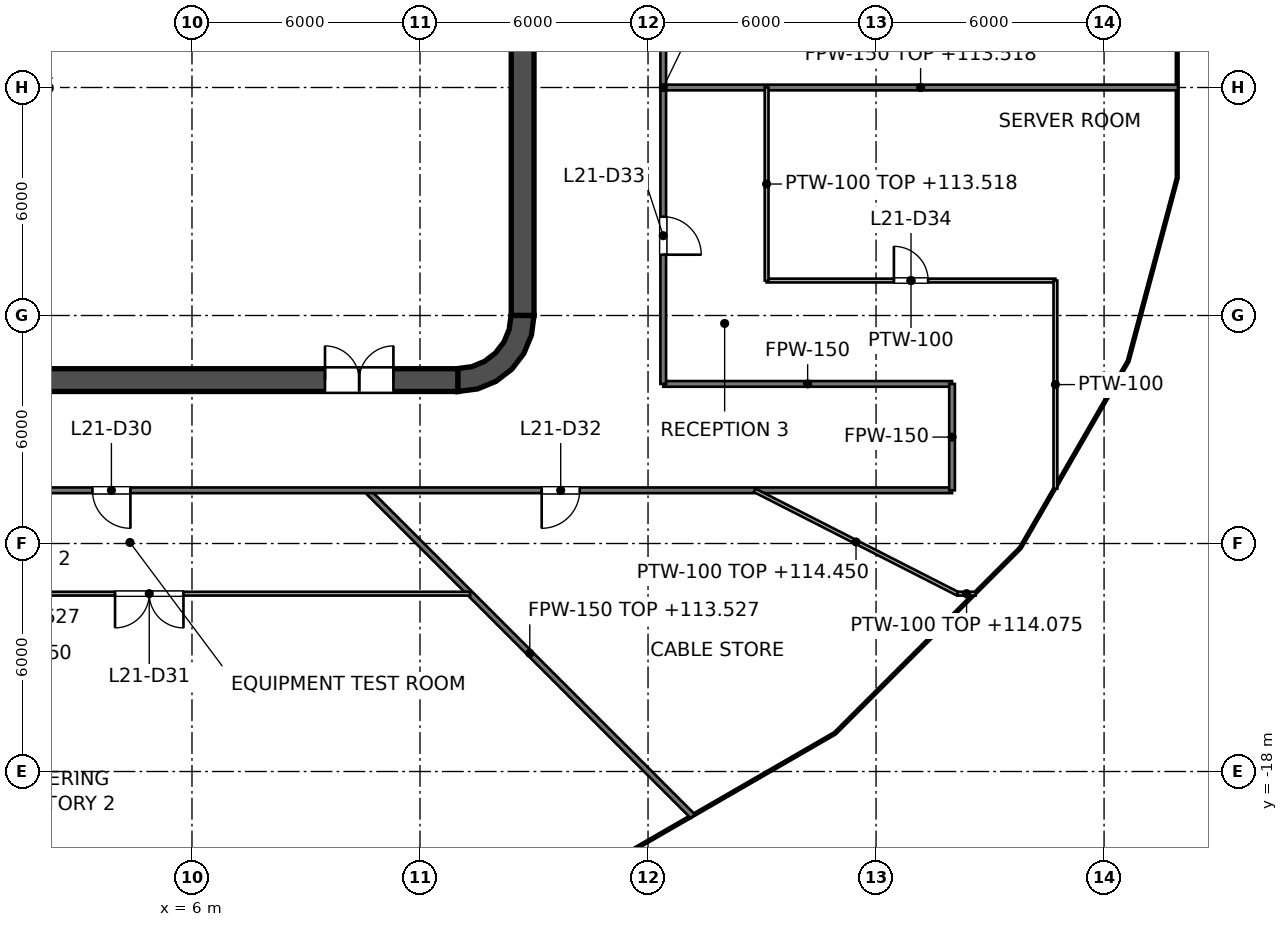
"""IFC4 building model, lengths in metres.
Left out: names, types, materials, properties, quantities, classifications, styles, units other than length and angle.
Written with IfcOpenShell. Run it as: python <this file> out.ifc"""

import sys

from ifc_helpers import new_model, si_unit, direction, frame, frame_2d, origin, place, context, subcontext, project, spatial, polyline, rectangle, outline, extrude, element, fill, save


model = new_model("IFC4")
c1 = context("Model", 3, precision=1e-05, world=origin(), true_north=direction((0.0, 1.0)))
c2 = subcontext(c1, "Body", "Model", "MODEL_VIEW")
j1 = project(units=[si_unit("LENGTHUNIT", "METRE"), si_unit("PLANEANGLEUNIT", "RADIAN")], contexts=[c1])
p1 = place(None, origin())
s1 = spatial("IfcSite", under=j1, at=p1, CompositionType="ELEMENT")
p2 = place(p1, origin())
s2 = spatial("IfcBuilding", under=s1, at=p2, CompositionType="ELEMENT")
p3 = place(p2, frame((0.0, 0.0, 110.4)))
s3 = spatial("IfcBuildingStorey", under=s2, at=p3, CompositionType="ELEMENT", Elevation=110.4)
p4 = place(p3, frame((-13.0, -7.7, 0.0), z_axis=(0.0, 0.0, 1.0), x_axis=(1.0, 0.0, 0.0)))
e1 = element("IfcWall", 1, at=p4, inside=s3, PredefinedType="SHEAR", context=c2, shape_type="SweptSolid", body=[
    extrude(rectangle(XDim=26.0, YDim=0.6, at=frame_2d((13.0, 0.0))), origin(), (0.0, 0.0, 1.0), 4.2),
])
p5 = place(p4, frame((1.7, 0.0, 0.0)))
e2 = element("IfcOpeningElement", 2, at=p5, cuts=e1, PredefinedType="OPENING", context=c2, shape_type="SweptSolid", body=[
    extrude(rectangle(XDim=1.8, YDim=2.1, at=frame_2d((0.9, 1.05))), frame((0.0, 0.3, 0.0), z_axis=(0.0, -1.0, 0.0), x_axis=(1.0, 0.0, 0.0)), (0.0, 0.0, 1.0), 0.6),
])
p6 = place(p4, frame((22.5, 0.0, 0.0)))
e3 = element("IfcOpeningElement", 3, at=p6, cuts=e1, PredefinedType="OPENING", context=c2, shape_type="SweptSolid", body=[
    extrude(rectangle(XDim=1.8, YDim=2.1, at=frame_2d((0.9, 1.05))), frame((0.0, 0.3, 0.0), z_axis=(0.0, -1.0, 0.0), x_axis=(1.0, 0.0, 0.0)), (0.0, 0.0, 1.0), 0.6),
])
p7 = place(p3, frame((14.7, -6.0, 0.0), z_axis=(0.0, 0.0, 1.0), x_axis=(0.0, 1.0, 0.0)))
e4 = element("IfcWall", 4, at=p7, inside=s3, PredefinedType="SHEAR", context=c2, shape_type="SweptSolid", body=[
    extrude(rectangle(XDim=12.0, YDim=0.6, at=frame_2d((6.0, 0.0))), origin(), (0.0, 0.0, 1.0), 4.2),
])
p8 = place(p3, origin())
e5 = element("IfcWall", 5, at=p8, inside=s3, PredefinedType="SHEAR", context=c2, shape_type="SweptSolid", body=[
    extrude(outline(polyline([(15.0, -6.0), (14.395, -6.0), (14.347, -6.361), (14.208, -6.698), (13.986, -6.986), (13.698, -7.208), (13.361, -7.347), (13.0, -7.395), (13.0, -8.0), (13.518, -7.932), (14.0, -7.732), (14.414, -7.414), (14.732, -7.0), (14.932, -6.518), (15.0, -6.0)])), origin(), (0.0, 0.0, 1.0), 4.2),
])
p9 = place(p3, frame((9.0, -6.6, 0.0), z_axis=(0.0, 0.0, 1.0), x_axis=(0.0, 1.0, 0.0)))
e6 = element("IfcWall", 6, at=p9, inside=s3, PredefinedType="SOLIDWALL", context=c2, shape_type="SweptSolid", body=[
    extrude(rectangle(XDim=2.5, YDim=0.25, at=frame_2d((1.25, 0.0))), origin(), (0.0, 0.0, 1.0), 4.05),
])
p10 = place(p9, frame((0.65, 0.0, 0.0)))
e7 = element("IfcOpeningElement", 7, at=p10, cuts=e6, PredefinedType="OPENING", context=c2, shape_type="SweptSolid", body=[
    extrude(rectangle(XDim=1.2, YDim=2.1, at=frame_2d((0.6, 1.05))), frame((0.0, 0.125, 0.0), z_axis=(0.0, -1.0, 0.0), x_axis=(1.0, 0.0, 0.0)), (0.0, 0.0, 1.0), 0.25),
])
p11 = place(p3, frame((3.15, -6.6, 0.0), z_axis=(0.0, 0.0, 1.0), x_axis=(0.0, 1.0, 0.0)))
e8 = element("IfcWall", 8, at=p11, inside=s3, PredefinedType="SOLIDWALL", context=c2, shape_type="SweptSolid", body=[
    extrude(rectangle(XDim=2.5, YDim=0.25, at=frame_2d((1.25, 0.0))), origin(), (0.0, 0.0, 1.0), 4.05),
])
p12 = place(p3, frame((-9.125, -7.0, 0.0), z_axis=(0.0, 0.0, 1.0), x_axis=(1.0, 0.0, 0.0)))
e9 = element("IfcWall", 9, at=p12, inside=s3, PredefinedType="SOLIDWALL", context=c2, shape_type="SweptSolid", body=[
    extrude(rectangle(XDim=18.25, YDim=0.8, at=frame_2d((9.125, 0.0))), origin(), (0.0, 0.0, 1.0), 4.05),
])
p13 = place(p3, frame((-9.125, -1.525, 0.0), z_axis=(0.0, 0.0, 1.0), x_axis=(1.0, 0.0, 0.0)))
e10 = element("IfcWall", 10, at=p13, inside=s3, PredefinedType="SOLIDWALL", context=c2, shape_type="SweptSolid", body=[
    extrude(rectangle(XDim=18.25, YDim=0.25, at=frame_2d((9.125, 0.0))), origin(), (0.0, 0.0, 1.0), 4.05),
])
p14 = place(p13, frame((7.15, 0.0, 0.0)))
e11 = element("IfcOpeningElement", 11, at=p14, cuts=e10, PredefinedType="OPENING", context=c2, shape_type="SweptSolid", body=[
    extrude(rectangle(XDim=1.2, YDim=2.1, at=frame_2d((0.6, 1.05))), frame((0.0, 0.125, 0.0), z_axis=(0.0, -1.0, 0.0), x_axis=(1.0, 0.0, 0.0)), (0.0, 0.0, 1.0), 0.25),
])
p15 = place(p13, frame((10.2, 0.0, 0.0)))
e12 = element("IfcOpeningElement", 12, at=p15, cuts=e10, PredefinedType="OPENING", context=c2, shape_type="SweptSolid", body=[
    extrude(rectangle(XDim=1.2, YDim=2.1, at=frame_2d((0.6, 1.05))), frame((0.0, 0.125, 0.0), z_axis=(0.0, -1.0, 0.0), x_axis=(1.0, 0.0, 0.0)), (0.0, 0.0, 1.0), 0.25),
])
p16 = place(p13, frame((16.075, 0.0, 0.0)))
e13 = element("IfcOpeningElement", 13, at=p16, cuts=e10, PredefinedType="OPENING", context=c2, shape_type="SweptSolid", body=[
    extrude(rectangle(XDim=1.0, YDim=2.1, at=frame_2d((0.5, 1.05))), frame((0.0, 0.125, 0.0), z_axis=(0.0, -1.0, 0.0), x_axis=(1.0, 0.0, 0.0)), (0.0, 0.0, 1.0), 0.25),
])
p17 = place(p3, frame((-9.125, -3.975, 0.0), z_axis=(0.0, 0.0, 1.0), x_axis=(1.0, 0.0, 0.0)))
e14 = element("IfcWall", 14, at=p17, inside=s3, PredefinedType="SOLIDWALL", context=c2, shape_type="SweptSolid", body=[
    extrude(rectangle(XDim=12.4, YDim=0.25, at=frame_2d((6.2, 0.0))), origin(), (0.0, 0.0, 1.0), 4.05),
])
p18 = place(p17, frame((1.05, 0.0, 0.0)))
e15 = element("IfcOpeningElement", 15, at=p18, cuts=e14, PredefinedType="OPENING", context=c2, shape_type="SweptSolid", body=[
    extrude(rectangle(XDim=1.2, YDim=2.1, at=frame_2d((0.6, 1.05))), frame((0.0, 0.125, 0.0), z_axis=(0.0, -1.0, 0.0), x_axis=(1.0, 0.0, 0.0)), (0.0, 0.0, 1.0), 0.25),
])
p19 = place(p17, frame((4.1, 0.0, 0.0)))
e16 = element("IfcOpeningElement", 16, at=p19, cuts=e14, PredefinedType="OPENING", context=c2, shape_type="SweptSolid", body=[
    extrude(rectangle(XDim=1.2, YDim=2.1, at=frame_2d((0.6, 1.05))), frame((0.0, 0.125, 0.0), z_axis=(0.0, -1.0, 0.0), x_axis=(1.0, 0.0, 0.0)), (0.0, 0.0, 1.0), 0.25),
])
p20 = place(p3, frame((3.275, -3.975, 0.0), z_axis=(0.0, 0.0, 1.0), x_axis=(1.0, 0.0, 0.0)))
e17 = element("IfcWall", 17, at=p20, inside=s3, PredefinedType="SOLIDWALL", context=c2, shape_type="SweptSolid", body=[
    extrude(rectangle(XDim=5.85, YDim=0.25, at=frame_2d((2.925, 0.0))), origin(), (0.0, 0.0, 1.0), 4.05),
])
for number, where, z_axis, x_axis in (
    (18, (3.2, -3.85, 0.0), (0.0, 0.0, 1.0), (0.0, 1.0, 0.0)),
    (19, (5.9, -3.85, 0.0), (0.0, 0.0, 1.0), (0.0, 1.0, 0.0)),
    (20, (9.0, -3.85, 0.0), (0.0, 0.0, 1.0), (0.0, 1.0, 0.0)),
):
    element("IfcWall", number, at=place(p3, frame(where, z_axis=z_axis, x_axis=x_axis)), inside=s3, PredefinedType="SOLIDWALL", context=c2, shape_type="SweptSolid", body=[
        extrude(rectangle(XDim=2.2, YDim=0.25, at=frame_2d((1.1, 0.0))), origin(), (0.0, 0.0, 1.0), 4.05),
    ])
p21 = place(p3, frame((11.8, -7.4, 0.0), z_axis=(0.0, 0.0, 1.0), x_axis=(0.0, 1.0, 0.0)))
e21 = element("IfcWall", 21, at=p21, inside=s3, PredefinedType="SOLIDWALL", context=c2, shape_type="SweptSolid", body=[
    extrude(rectangle(XDim=14.8, YDim=0.4, at=frame_2d((7.4, 0.0))), origin(), (0.0, 0.0, 1.0), 4.05),
])
p22 = place(p21, frame((11.2, 0.0, 0.0)))
e22 = element("IfcOpeningElement", 22, at=p22, cuts=e21, PredefinedType="OPENING", context=c2, shape_type="SweptSolid", body=[
    extrude(rectangle(XDim=1.1, YDim=2.1, at=frame_2d((0.55, 1.05))), frame((0.0, 0.2, 0.0), z_axis=(0.0, -1.0, 0.0), x_axis=(1.0, 0.0, 0.0)), (0.0, 0.0, 1.0), 0.4),
])
p23 = place(p21, frame((8.3, 0.0, 0.0)))
e23 = element("IfcOpeningElement", 23, at=p23, cuts=e21, PredefinedType="OPENING", context=c2, shape_type="SweptSolid", body=[
    extrude(rectangle(XDim=1.1, YDim=2.1, at=frame_2d((0.55, 1.05))), frame((0.0, 0.2, 0.0), z_axis=(0.0, -1.0, 0.0), x_axis=(1.0, 0.0, 0.0)), (0.0, 0.0, 1.0), 0.4),
])
p24 = place(p21, frame((5.4, 0.0, 0.0)))
e24 = element("IfcOpeningElement", 24, at=p24, cuts=e21, PredefinedType="OPENING", context=c2, shape_type="SweptSolid", body=[
    extrude(rectangle(XDim=1.1, YDim=2.1, at=frame_2d((0.55, 1.05))), frame((0.0, 0.2, 0.0), z_axis=(0.0, -1.0, 0.0), x_axis=(1.0, 0.0, 0.0)), (0.0, 0.0, 1.0), 0.4),
])
p25 = place(p21, frame((13.552, 0.0, 0.0)))
e25 = element("IfcOpeningElement", 25, at=p25, cuts=e21, PredefinedType="OPENING", context=c2, shape_type="SweptSolid", body=[
    extrude(rectangle(XDim=0.9, YDim=2.1, at=frame_2d((0.45, 1.05))), frame((0.0, 0.2, 0.0), z_axis=(0.0, -1.0, 0.0), x_axis=(1.0, 0.0, 0.0)), (0.0, 0.0, 1.0), 0.4),
])
p26 = place(p21, frame((0.347, 0.0, 0.0)))
e26 = element("IfcOpeningElement", 26, at=p26, cuts=e21, PredefinedType="OPENING", context=c2, shape_type="SweptSolid", body=[
    extrude(rectangle(XDim=0.9, YDim=2.1, at=frame_2d((0.45, 1.05))), frame((0.0, 0.2, 0.0), z_axis=(0.0, -1.0, 0.0), x_axis=(1.0, 0.0, 0.0)), (0.0, 0.0, 1.0), 0.4),
])
e27 = element("IfcWall", 27, at=p8, inside=s3, PredefinedType="SOLIDWALL", context=c2, shape_type="SweptSolid", body=[
    extrude(outline(polyline([(12.0, -5.675), (12.0, -5.925), (14.15, -5.925), (14.4, -5.925), (14.4, -5.675), (14.4, -3.025), (14.4, -2.775), (14.4, -0.125), (14.4, 0.125), (14.4, 2.775), (14.4, 3.025), (14.4, 5.675), (14.4, 5.925), (14.15, 5.925), (12.0, 5.925), (12.0, 5.675), (14.15, 5.675), (14.15, 3.025), (12.0, 3.025), (12.0, 2.775), (14.15, 2.775), (14.15, 0.125), (12.0, 0.125), (12.0, -0.125), (14.15, -0.125), (14.15, -2.775), (12.0, -2.775), (12.0, -3.025), (14.15, -3.025), (14.15, -5.675), (12.0, -5.675)])), origin(), (0.0, 0.0, 1.0), 4.05),
])
p27 = place(p3, frame((10.6, -10.6, 0.0), z_axis=(0.0, 0.0, 1.0), x_axis=(0.707106781187, -0.707106781187, 0.0)))
e28 = element("IfcWall", 28, at=p27, inside=s3, PredefinedType="PARTITIONING", context=c2, shape_type="SweptSolid", body=[
    extrude(rectangle(XDim=12.13, YDim=0.15, at=frame_2d((6.065, 0.0))), origin(), (0.0, 0.0, 1.0), 3.127),
])
p28 = place(p3, frame((-26.0, -10.6, 0.0), z_axis=(0.0, 0.0, 1.0), x_axis=(1.0, 0.0, 0.0)))
e29 = element("IfcWall", 29, at=p28, inside=s3, PredefinedType="PARTITIONING", context=c2, shape_type="SweptSolid", body=[
    extrude(rectangle(XDim=52.0, YDim=0.15, at=frame_2d((26.0, 0.0))), origin(), (0.0, 0.0, 1.0), 3.127),
])
p29 = place(p28, frame((8.934, 0.0, 0.0)))
e30 = element("IfcOpeningElement", 30, at=p29, cuts=e29, PredefinedType="OPENING", context=c2, shape_type="SweptSolid", body=[
    extrude(rectangle(XDim=1.2, YDim=2.1, at=frame_2d((0.6, 1.05))), frame((0.0, 0.075, 0.0), z_axis=(0.0, -1.0, 0.0), x_axis=(1.0, 0.0, 0.0)), (0.0, 0.0, 1.0), 0.15),
])
p30 = place(p28, frame((19.913, 0.0, 0.0)))
e31 = element("IfcOpeningElement", 31, at=p30, cuts=e29, PredefinedType="OPENING", context=c2, shape_type="SweptSolid", body=[
    extrude(rectangle(XDim=1.0, YDim=2.1, at=frame_2d((0.5, 1.05))), frame((0.0, 0.075, 0.0), z_axis=(0.0, -1.0, 0.0), x_axis=(1.0, 0.0, 0.0)), (0.0, 0.0, 1.0), 0.15),
])
p31 = place(p28, frame((21.763, 0.0, 0.0)))
e32 = element("IfcOpeningElement", 32, at=p31, cuts=e29, PredefinedType="OPENING", context=c2, shape_type="SweptSolid", body=[
    extrude(rectangle(XDim=1.0, YDim=2.1, at=frame_2d((0.5, 1.05))), frame((0.0, 0.075, 0.0), z_axis=(0.0, -1.0, 0.0), x_axis=(1.0, 0.0, 0.0)), (0.0, 0.0, 1.0), 0.15),
])
p32 = place(p28, frame((29.38, 0.0, 0.0)))
e33 = element("IfcOpeningElement", 33, at=p32, cuts=e29, PredefinedType="OPENING", context=c2, shape_type="SweptSolid", body=[
    extrude(rectangle(XDim=1.0, YDim=2.1, at=frame_2d((0.5, 1.05))), frame((0.0, 0.075, 0.0), z_axis=(0.0, -1.0, 0.0), x_axis=(1.0, 0.0, 0.0)), (0.0, 0.0, 1.0), 0.15),
])
p33 = place(p28, frame((41.202, 0.0, 0.0)))
e34 = element("IfcOpeningElement", 34, at=p33, cuts=e29, PredefinedType="OPENING", context=c2, shape_type="SweptSolid", body=[
    extrude(rectangle(XDim=1.0, YDim=2.1, at=frame_2d((0.5, 1.05))), frame((0.0, 0.075, 0.0), z_axis=(0.0, -1.0, 0.0), x_axis=(1.0, 0.0, 0.0)), (0.0, 0.0, 1.0), 0.15),
])
p34 = place(p3, frame((18.4, -7.8, 0.0), z_axis=(0.0, 0.0, 1.0), x_axis=(1.0, 0.0, 0.0)))
e35 = element("IfcWall", 35, at=p34, inside=s3, PredefinedType="PARTITIONING", context=c2, shape_type="SweptSolid", body=[
    extrude(rectangle(XDim=7.6, YDim=0.15, at=frame_2d((3.8, 0.0))), origin(), (0.0, 0.0, 1.0), 3.195),
])
p35 = place(p3, frame((18.4, 0.0, 0.0), z_axis=(0.0, 0.0, 1.0), x_axis=(1.0, 0.0, 0.0)))
e36 = element("IfcWall", 36, at=p35, inside=s3, PredefinedType="PARTITIONING", context=c2, shape_type="SweptSolid", body=[
    extrude(rectangle(XDim=13.544, YDim=0.15, at=frame_2d((6.772, 0.0))), origin(), (0.0, 0.0, 1.0), 3.118),
])
p36 = place(p3, frame((26.0, -10.6, 0.0), z_axis=(0.0, 0.0, 1.0), x_axis=(0.0, 1.0, 0.0)))
e37 = element("IfcWall", 37, at=p36, inside=s3, PredefinedType="PARTITIONING", context=c2, shape_type="SweptSolid", body=[
    extrude(rectangle(XDim=2.8, YDim=0.15, at=frame_2d((1.4, 0.0))), origin(), (0.0, 0.0, 1.0), 3.195),
])
p37 = place(p3, frame((18.4, -7.8, 0.0), z_axis=(0.0, 0.0, 1.0), x_axis=(0.0, 1.0, 0.0)))
e38 = element("IfcWall", 38, at=p37, inside=s3, PredefinedType="PARTITIONING", context=c2, shape_type="SweptSolid", body=[
    extrude(rectangle(XDim=15.6, YDim=0.15, at=frame_2d((7.8, 0.0))), origin(), (0.0, 0.0, 1.0), 3.118),
])
p38 = place(p37, frame((3.4, 0.0, 0.0)))
e39 = element("IfcOpeningElement", 39, at=p38, cuts=e38, PredefinedType="OPENING", context=c2, shape_type="SweptSolid", body=[
    extrude(rectangle(XDim=1.0, YDim=2.1, at=frame_2d((0.5, 1.05))), frame((0.0, 0.075, 0.0), z_axis=(0.0, -1.0, 0.0), x_axis=(1.0, 0.0, 0.0)), (0.0, 0.0, 1.0), 0.15),
])
p39 = place(p37, frame((11.1, 0.0, 0.0)))
e40 = element("IfcOpeningElement", 40, at=p39, cuts=e38, PredefinedType="OPENING", context=c2, shape_type="SweptSolid", body=[
    extrude(rectangle(XDim=1.2, YDim=2.1, at=frame_2d((0.6, 1.05))), frame((0.0, 0.075, 0.0), z_axis=(0.0, -1.0, 0.0), x_axis=(1.0, 0.0, 0.0)), (0.0, 0.0, 1.0), 0.15),
])
p40 = place(p3, frame((20.804, -10.6, 0.0), z_axis=(0.0, 0.0, 1.0), x_axis=(0.891002798049, -0.453997812626, 0.0)))
e41 = element("IfcWall", 41, at=p40, inside=s3, PredefinedType="PARTITIONING", context=c2, shape_type="SweptSolid", body=[
    extrude(rectangle(XDim=5.991, YDim=0.1, at=frame_2d((2.996, 0.0))), origin(), (0.0, 0.0, 1.0), 4.05),
])
p41 = place(p3, frame((-26.621, -13.32, 0.0), z_axis=(0.0, 0.0, 1.0), x_axis=(1.0, 0.0, 0.0)))
e42 = element("IfcWall", 42, at=p41, inside=s3, PredefinedType="PARTITIONING", context=c2, shape_type="SweptSolid", body=[
    extrude(rectangle(XDim=39.941, YDim=0.1, at=frame_2d((19.971, 0.0))), origin(), (0.0, 0.0, 1.0), 3.127),
])
p42 = place(p41, frame((8.118, 0.0, 0.0)))
e43 = element("IfcOpeningElement", 43, at=p42, cuts=e42, PredefinedType="OPENING", context=c2, shape_type="SweptSolid", body=[
    extrude(rectangle(XDim=1.8, YDim=2.1, at=frame_2d((0.9, 1.05))), frame((0.0, 0.05, 0.0), z_axis=(0.0, -1.0, 0.0), x_axis=(1.0, 0.0, 0.0)), (0.0, 0.0, 1.0), 0.1),
])
p43 = place(p41, frame((30.596, 0.0, 0.0)))
e44 = element("IfcOpeningElement", 44, at=p43, cuts=e42, PredefinedType="OPENING", context=c2, shape_type="SweptSolid", body=[
    extrude(rectangle(XDim=1.8, YDim=2.1, at=frame_2d((0.9, 1.05))), frame((0.0, 0.05, 0.0), z_axis=(0.0, -1.0, 0.0), x_axis=(1.0, 0.0, 0.0)), (0.0, 0.0, 1.0), 0.1),
])
p44 = place(p3, frame((26.142, -13.32, 0.0), z_axis=(0.0, 0.0, 1.0), x_axis=(1.0, 0.0, 0.0)))
e45 = element("IfcWall", 45, at=p44, inside=s3, PredefinedType="PARTITIONING", context=c2, shape_type="SweptSolid", body=[
    extrude(rectangle(XDim=0.479, YDim=0.1, at=frame_2d((0.24, 0.0))), origin(), (0.0, 0.0, 1.0), 3.675),
])
p45 = place(p3, frame((21.12, -5.08, 0.0), z_axis=(0.0, 0.0, 1.0), x_axis=(1.0, 0.0, 0.0)))
e46 = element("IfcWall", 46, at=p45, inside=s3, PredefinedType="PARTITIONING", context=c2, shape_type="SweptSolid", body=[
    extrude(rectangle(XDim=7.6, YDim=0.1, at=frame_2d((3.8, 0.0))), origin(), (0.0, 0.0, 1.0), 3.127),
])
p46 = place(p45, frame((3.35, 0.0, 0.0)))
e47 = element("IfcOpeningElement", 47, at=p46, cuts=e46, PredefinedType="OPENING", context=c2, shape_type="SweptSolid", body=[
    extrude(rectangle(XDim=0.9, YDim=2.1, at=frame_2d((0.45, 1.05))), frame((0.0, 0.05, 0.0), z_axis=(0.0, -1.0, 0.0), x_axis=(1.0, 0.0, 0.0)), (0.0, 0.0, 1.0), 0.1),
])
p47 = place(p3, frame((28.72, -10.556, 0.0), z_axis=(0.0, 0.0, 1.0), x_axis=(0.0, 1.0, 0.0)))
e48 = element("IfcWall", 48, at=p47, inside=s3, PredefinedType="PARTITIONING", context=c2, shape_type="SweptSolid", body=[
    extrude(rectangle(XDim=5.476, YDim=0.1, at=frame_2d((2.738, 0.0))), origin(), (0.0, 0.0, 1.0), 3.127),
])
p48 = place(p3, frame((21.12, -5.08, 0.0), z_axis=(0.0, 0.0, 1.0), x_axis=(0.0, 1.0, 0.0)))
e49 = element("IfcWall", 49, at=p48, inside=s3, PredefinedType="PARTITIONING", context=c2, shape_type="SweptSolid", body=[
    extrude(rectangle(XDim=5.08, YDim=0.1, at=frame_2d((2.54, 0.0))), origin(), (0.0, 0.0, 1.0), 3.118),
])
p49 = place(p23, origin())
e50 = element("IfcDoor", 50, at=p49, inside=s3, OperationType="DOUBLE_DOOR_SLIDING", PredefinedType="DOOR", context=c2, shape_type="SweptSolid", body=[
    extrude(rectangle(XDim=1.1, YDim=2.1, at=frame_2d((0.55, 1.05))), frame((0.0, 0.025, 0.0), z_axis=(0.0, -1.0, 0.0), x_axis=(1.0, 0.0, 0.0)), (0.0, 0.0, 1.0), 0.05),
])
fill(e23, e50)
p50 = place(p24, origin())
e51 = element("IfcDoor", 51, at=p50, inside=s3, OperationType="DOUBLE_DOOR_SLIDING", PredefinedType="DOOR", context=c2, shape_type="SweptSolid", body=[
    extrude(rectangle(XDim=1.1, YDim=2.1, at=frame_2d((0.55, 1.05))), frame((0.0, 0.025, 0.0), z_axis=(0.0, -1.0, 0.0), x_axis=(1.0, 0.0, 0.0)), (0.0, 0.0, 1.0), 0.05),
])
fill(e24, e51)
p51 = place(p10, origin())
e52 = element("IfcDoor", 52, at=p51, inside=s3, OperationType="SINGLE_SWING_LEFT", PredefinedType="DOOR", context=c2, shape_type="SweptSolid", body=[
    extrude(rectangle(XDim=1.2, YDim=2.1, at=frame_2d((0.6, 1.05))), frame((0.0, 0.025, 0.0), z_axis=(0.0, -1.0, 0.0), x_axis=(1.0, 0.0, 0.0)), (0.0, 0.0, 1.0), 0.05),
])
fill(e7, e52)
p52 = place(p16, origin())
e53 = element("IfcDoor", 53, at=p52, inside=s3, OperationType="SINGLE_SWING_RIGHT", PredefinedType="DOOR", context=c2, shape_type="SweptSolid", body=[
    extrude(rectangle(XDim=1.0, YDim=2.1, at=frame_2d((0.5, 1.05))), frame((0.0, 0.025, 0.0), z_axis=(0.0, -1.0, 0.0), x_axis=(1.0, 0.0, 0.0)), (0.0, 0.0, 1.0), 0.05),
])
fill(e13, e53)
p53 = place(p26, origin())
e54 = element("IfcDoor", 54, at=p53, inside=s3, OperationType="SINGLE_SWING_RIGHT", PredefinedType="DOOR", context=c2, shape_type="SweptSolid", body=[
    extrude(rectangle(XDim=0.9, YDim=2.1, at=frame_2d((0.45, 1.05))), frame((0.0, 0.025, 0.0), z_axis=(0.0, -1.0, 0.0), x_axis=(1.0, 0.0, 0.0)), (0.0, 0.0, 1.0), 0.05),
])
fill(e26, e54)
p54 = place(p6, origin())
e55 = element("IfcDoor", 55, at=p54, inside=s3, OperationType="DOUBLE_DOOR_SINGLE_SWING", PredefinedType="DOOR", context=c2, shape_type="SweptSolid", body=[
    extrude(rectangle(XDim=1.8, YDim=2.1, at=frame_2d((0.9, 1.05))), frame((0.0, 0.025, 0.0), z_axis=(0.0, -1.0, 0.0), x_axis=(1.0, 0.0, 0.0)), (0.0, 0.0, 1.0), 0.05),
])
fill(e3, e55)
p55 = place(p32, origin())
e56 = element("IfcDoor", 56, at=p55, inside=s3, OperationType="SINGLE_SWING_RIGHT", PredefinedType="DOOR", context=c2, shape_type="SweptSolid", body=[
    extrude(rectangle(XDim=1.0, YDim=2.1, at=frame_2d((0.5, 1.05))), frame((0.0, 0.025, 0.0), z_axis=(0.0, -1.0, 0.0), x_axis=(1.0, 0.0, 0.0)), (0.0, 0.0, 1.0), 0.05),
])
fill(e33, e56)
p56 = place(p43, origin())
e57 = element("IfcDoor", 57, at=p56, inside=s3, OperationType="DOUBLE_DOOR_SINGLE_SWING", PredefinedType="DOOR", context=c2, shape_type="SweptSolid", body=[
    extrude(rectangle(XDim=1.8, YDim=2.1, at=frame_2d((0.9, 1.05))), frame((0.0, 0.025, 0.0), z_axis=(0.0, -1.0, 0.0), x_axis=(1.0, 0.0, 0.0)), (0.0, 0.0, 1.0), 0.05),
])
fill(e44, e57)
p57 = place(p33, origin())
e58 = element("IfcDoor", 58, at=p57, inside=s3, OperationType="SINGLE_SWING_LEFT", PredefinedType="DOOR", context=c2, shape_type="SweptSolid", body=[
    extrude(rectangle(XDim=1.0, YDim=2.1, at=frame_2d((0.5, 1.05))), frame((0.0, 0.025, 0.0), z_axis=(0.0, -1.0, 0.0), x_axis=(1.0, 0.0, 0.0)), (0.0, 0.0, 1.0), 0.05),
])
fill(e34, e58)
p58 = place(p38, origin())
e59 = element("IfcDoor", 59, at=p58, inside=s3, OperationType="SINGLE_SWING_LEFT", PredefinedType="DOOR", context=c2, shape_type="SweptSolid", body=[
    extrude(rectangle(XDim=1.0, YDim=2.1, at=frame_2d((0.5, 1.05))), frame((0.0, 0.025, 0.0), z_axis=(0.0, -1.0, 0.0), x_axis=(1.0, 0.0, 0.0)), (0.0, 0.0, 1.0), 0.05),
])
fill(e39, e59)
p59 = place(p46, origin())
e60 = element("IfcDoor", 60, at=p59, inside=s3, OperationType="SINGLE_SWING_LEFT", PredefinedType="DOOR", context=c2, shape_type="SweptSolid", body=[
    extrude(rectangle(XDim=0.9, YDim=2.1, at=frame_2d((0.45, 1.05))), frame((0.0, 0.025, 0.0), z_axis=(0.0, -1.0, 0.0), x_axis=(1.0, 0.0, 0.0)), (0.0, 0.0, 1.0), 0.05),
])
fill(e47, e60)
save(model, sys.argv[1])
